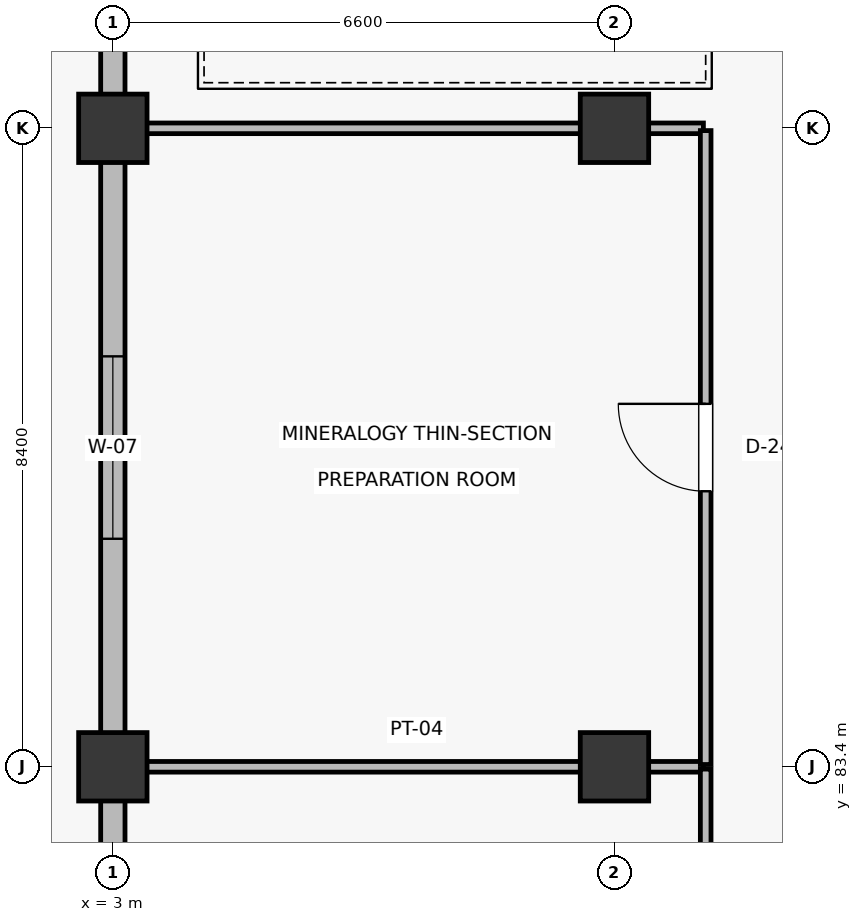
"""IFC4 building model, lengths in metres.
Left out: names, types, materials, properties, quantities, classifications, styles, units other than length and angle.
Written with IfcOpenShell. Run it as: python <this file> out.ifc"""

import sys

from ifc_helpers import new_model, si_unit, direction, frame, frame_2d, origin, origin_2d, place, context, subcontext, project, spatial, rectangle, extrude, element, fill, save


model = new_model("IFC4")
c1 = context("Model", 3, precision=1e-05, world=origin(), true_north=direction((0.0, 1.0)))
c2 = subcontext(c1, "Body", "Model", "MODEL_VIEW")
j1 = project(units=[si_unit("LENGTHUNIT", "METRE"), si_unit("PLANEANGLEUNIT", "RADIAN")], contexts=[c1])
p1 = place(None, origin())
s1 = spatial("IfcSite", under=j1, at=p1, CompositionType="ELEMENT")
p2 = place(p1, origin())
s2 = spatial("IfcBuilding", under=s1, at=p2, CompositionType="ELEMENT")
p3 = place(p2, origin())
s3 = spatial("IfcBuildingStorey", under=s2, at=p3, CompositionType="ELEMENT", Elevation=0.0)
for number, where, z_axis, x_axis in (
    (1, (3.0, 83.4, 0.0), (0.0, 0.0, 1.0), (1.0, 0.0, 0.0)),
    (2, (3.0, 91.8, 0.0), (0.0, 0.0, 1.0), (1.0, 0.0, 0.0)),
    (3, (9.6, 83.4, 0.0), (0.0, 0.0, 1.0), (1.0, 0.0, 0.0)),
    (4, (9.6, 91.8, 0.0), (0.0, 0.0, 1.0), (1.0, 0.0, 0.0)),
):
    element("IfcColumn", number, at=place(p3, frame(where, z_axis=z_axis, x_axis=x_axis)), inside=s3, PredefinedType="COLUMN", context=c2, shape_type="SweptSolid", body=[
        extrude(rectangle(XDim=0.9, YDim=0.9, at=origin_2d()), origin(), (0.0, 0.0, 1.0), 5.4),
    ])
p4 = place(p3, frame((3.0, 76.635, 0.0), z_axis=(0.0, 0.0, 1.0), x_axis=(0.0, 1.0, 0.0)))
e5 = element("IfcWall", 5, at=p4, inside=s3, PredefinedType="SOLIDWALL", context=c2, shape_type="SweptSolid", body=[
    extrude(rectangle(XDim=6.33, YDim=0.32, at=frame_2d((3.165, 0.0))), origin(), (0.0, 0.0, 1.0), 4.375),
])
p5 = place(p4, frame((2.415, 0.0, 0.9)))
e6 = element("IfcOpeningElement", 6, at=p5, cuts=e5, PredefinedType="OPENING", context=c2, shape_type="SweptSolid", body=[
    extrude(rectangle(XDim=1.5, YDim=1.9, at=frame_2d((0.75, 0.95))), frame((0.0, 0.17, 0.0), z_axis=(0.0, -1.0, 0.0), x_axis=(1.0, 0.0, 0.0)), (0.0, 0.0, 1.0), 0.34),
])
p6 = place(p3, frame((3.0, 83.835, 0.0), z_axis=(0.0, 0.0, 1.0), x_axis=(0.0, 1.0, 0.0)))
e7 = element("IfcWall", 7, at=p6, inside=s3, PredefinedType="SOLIDWALL", context=c2, shape_type="SweptSolid", body=[
    extrude(rectangle(XDim=7.53, YDim=0.32, at=frame_2d((3.765, 0.0))), origin(), (0.0, 0.0, 1.0), 4.375),
])
p7 = place(p6, frame((2.565, 0.0, 0.9)))
e8 = element("IfcOpeningElement", 8, at=p7, cuts=e7, PredefinedType="OPENING", context=c2, shape_type="SweptSolid", body=[
    extrude(rectangle(XDim=2.4, YDim=1.95, at=frame_2d((1.2, 0.975))), frame((0.0, 0.17, 0.0), z_axis=(0.0, -1.0, 0.0), x_axis=(1.0, 0.0, 0.0)), (0.0, 0.0, 1.0), 0.34),
])
p8 = place(p3, frame((3.0, 92.235, 0.0), z_axis=(0.0, 0.0, 1.0), x_axis=(0.0, 1.0, 0.0)))
e9 = element("IfcWall", 9, at=p8, inside=s3, PredefinedType="SOLIDWALL", context=c2, shape_type="SweptSolid", body=[
    extrude(rectangle(XDim=7.53, YDim=0.32, at=frame_2d((3.765, 0.0))), origin(), (0.0, 0.0, 1.0), 4.375),
])
p9 = place(p8, frame((1.965, 0.0, 0.0)))
e10 = element("IfcOpeningElement", 10, at=p9, cuts=e9, PredefinedType="OPENING", context=c2, shape_type="SweptSolid", body=[
    extrude(rectangle(XDim=3.6, YDim=3.9, at=frame_2d((1.8, 1.95))), frame((0.0, 0.17, 0.0), z_axis=(0.0, -1.0, 0.0), x_axis=(1.0, 0.0, 0.0)), (0.0, 0.0, 1.0), 0.34),
])
p10 = place(p3, frame((3.23, 83.4, 0.0), z_axis=(0.0, 0.0, 1.0), x_axis=(1.0, 0.0, 0.0)))
e11 = element("IfcWall", 11, at=p10, inside=s3, PredefinedType="PARTITIONING", context=c2, shape_type="SweptSolid", body=[
    extrude(rectangle(XDim=7.54, YDim=0.14, at=frame_2d((3.77, 0.0))), origin(), (0.0, 0.0, 1.0), 4.325),
])
p11 = place(p3, frame((10.8, 55.53, 0.0), z_axis=(0.0, 0.0, 1.0), x_axis=(0.0, 1.0, 0.0)))
e12 = element("IfcWall", 12, at=p11, inside=s3, PredefinedType="PARTITIONING", context=c2, shape_type="SweptSolid", body=[
    extrude(rectangle(XDim=27.84, YDim=0.14, at=frame_2d((13.92, 0.0))), origin(), (0.0, 0.0, 1.0), 4.155),
])
p12 = place(p11, frame((13.38, 0.0, 0.0)))
e13 = element("IfcOpeningElement", 13, at=p12, cuts=e12, PredefinedType="OPENING", context=c2, shape_type="SweptSolid", body=[
    extrude(rectangle(XDim=1.08, YDim=2.15, at=frame_2d((0.54, 1.075))), frame((0.0, 0.08, 0.0), z_axis=(0.0, -1.0, 0.0), x_axis=(1.0, 0.0, 0.0)), (0.0, 0.0, 1.0), 0.16),
])
p13 = place(p3, frame((3.23, 91.8, 0.0), z_axis=(0.0, 0.0, 1.0), x_axis=(1.0, 0.0, 0.0)))
e14 = element("IfcWall", 14, at=p13, inside=s3, PredefinedType="PARTITIONING", context=c2, shape_type="SweptSolid", body=[
    extrude(rectangle(XDim=7.54, YDim=0.14, at=frame_2d((3.77, 0.0))), origin(), (0.0, 0.0, 1.0), 4.275),
])
p14 = place(p3, frame((10.8, 83.43, 0.0), z_axis=(0.0, 0.0, 1.0), x_axis=(0.0, 1.0, 0.0)))
e15 = element("IfcWall", 15, at=p14, inside=s3, PredefinedType="PARTITIONING", context=c2, shape_type="SweptSolid", body=[
    extrude(rectangle(XDim=8.34, YDim=0.14, at=frame_2d((4.17, 0.0))), origin(), (0.0, 0.0, 1.0), 4.275),
])
p15 = place(p14, frame((3.595, 0.0, 0.0)))
e16 = element("IfcOpeningElement", 16, at=p15, cuts=e15, PredefinedType="OPENING", context=c2, shape_type="SweptSolid", body=[
    extrude(rectangle(XDim=1.15, YDim=2.15, at=frame_2d((0.575, 1.075))), frame((0.0, 0.08, 0.0), z_axis=(0.0, -1.0, 0.0), x_axis=(1.0, 0.0, 0.0)), (0.0, 0.0, 1.0), 0.16),
])
p16 = place(p7, origin())
e17 = element("IfcWindow", 17, at=p16, inside=s3, PartitioningType="DOUBLE_PANEL_VERTICAL", PredefinedType="WINDOW", context=c2, shape_type="SweptSolid", body=[
    extrude(rectangle(XDim=2.4, YDim=1.95, at=frame_2d((1.2, 0.975))), frame((0.0, 0.03, 0.0), z_axis=(0.0, -1.0, 0.0), x_axis=(1.0, 0.0, 0.0)), (0.0, 0.0, 1.0), 0.06),
])
fill(e8, e17)
p17 = place(p15, origin())
e18 = element("IfcDoor", 18, at=p17, inside=s3, OperationType="SINGLE_SWING_RIGHT", PredefinedType="DOOR", context=c2, shape_type="SweptSolid", body=[
    extrude(rectangle(XDim=1.15, YDim=2.15, at=frame_2d((0.575, 1.075))), frame((0.0, 0.025, 0.0), z_axis=(0.0, -1.0, 0.0), x_axis=(1.0, 0.0, 0.0)), (0.0, 0.0, 1.0), 0.05),
])
fill(e16, e18)
save(model, sys.argv[1])
